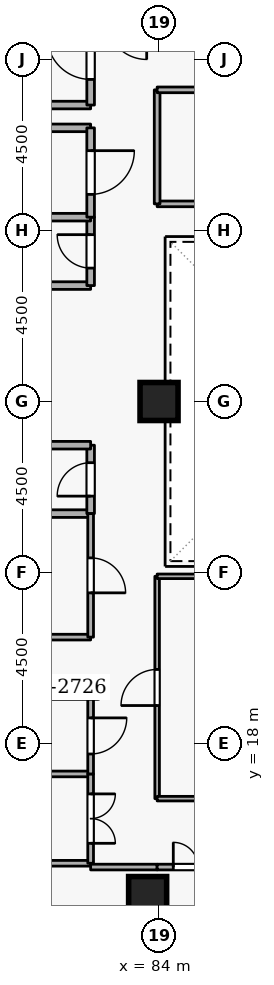
"""IFC4 building model, lengths in metres.
Left out: names, types, materials, properties, quantities, classifications, styles, units other than length and angle.
Written with IfcOpenShell. Run it as: python <this file> out.ifc"""

import sys

from ifc_helpers import new_model, si_unit, direction, frame, frame_2d, origin, origin_2d, place, context, subcontext, project, spatial, rectangle, extrude, element, fill, save


model = new_model("IFC4")
c1 = context("Model", 3, precision=1e-05, world=origin(), true_north=direction((0.0, 1.0)))
c2 = subcontext(c1, "Body", "Model", "MODEL_VIEW")
j1 = project(units=[si_unit("LENGTHUNIT", "METRE"), si_unit("PLANEANGLEUNIT", "RADIAN")], contexts=[c1])
p1 = place(None, origin())
s1 = spatial("IfcSite", under=j1, at=p1, CompositionType="ELEMENT")
p2 = place(p1, origin())
s2 = spatial("IfcBuilding", under=s1, at=p2, CompositionType="ELEMENT")
p3 = place(p2, frame((0.0, 0.0, 225.9)))
s3 = spatial("IfcBuildingStorey", under=s2, at=p3, CompositionType="ELEMENT", Elevation=225.9)
p4 = place(p3, frame((76.6, 19.45, 0.0), z_axis=(0.0, 0.0, 1.0), x_axis=(1.0, 0.0, 0.0)))
e1 = element("IfcWall", 1, at=p4, inside=s3, PredefinedType="SHEAR", context=c2, shape_type="SweptSolid", body=[
    extrude(rectangle(XDim=5.8, YDim=0.5, at=frame_2d((2.9, 0.0))), origin(), (0.0, 0.0, 1.0), 3.6),
])
for number, where, z_axis, x_axis in (
    (2, (83.7, 14.0, 0.0), (0.0, 0.0, 1.0), (1.0, 0.0, 0.0)),
    (3, (84.0, 27.0, 0.0), (0.0, 0.0, 1.0), (1.0, 0.0, 0.0)),
):
    element("IfcColumn", number, at=place(p3, frame(where, z_axis=z_axis, x_axis=x_axis)), inside=s3, PredefinedType="COLUMN", context=c2, shape_type="SweptSolid", body=[
        extrude(rectangle(XDim=1.0, YDim=1.0, at=origin_2d()), origin(), (0.0, 0.0, 1.0), 3.6),
    ])
p5 = place(p3, frame((79.9, 34.8, 0.0), z_axis=(0.0, 0.0, 1.0), x_axis=(1.0, 0.0, 0.0)))
e4 = element("IfcWall", 4, at=p5, inside=s3, PredefinedType="STANDARD", context=c2, shape_type="SweptSolid", body=[
    extrude(rectangle(XDim=2.3, YDim=0.2, at=frame_2d((1.15, 0.0))), origin(), (0.0, 0.0, 1.0), 2.505),
])
p6 = place(p3, frame((82.2, 34.8, 0.0), z_axis=(0.0, 0.0, 1.0), x_axis=(0.0, 1.0, 0.0)))
e5 = element("IfcWall", 5, at=p6, inside=s3, PredefinedType="STANDARD", context=c2, shape_type="SweptSolid", body=[
    extrude(rectangle(XDim=2.5, YDim=0.2, at=frame_2d((1.25, 0.0))), origin(), (0.0, 0.0, 1.0), 3.3),
])
p7 = place(p6, frame((0.675, 0.0, 0.0)))
e6 = element("IfcOpeningElement", 6, at=p7, cuts=e5, PredefinedType="OPENING", context=c2, shape_type="SweptSolid", body=[
    extrude(rectangle(XDim=1.15, YDim=2.1, at=frame_2d((0.575, 1.05))), frame((0.0, 0.11, 0.0), z_axis=(0.0, -1.0, 0.0), x_axis=(1.0, 0.0, 0.0)), (0.0, 0.0, 1.0), 0.22),
])
p8 = place(p3, frame((80.15, 24.05, 0.0), z_axis=(0.0, 0.0, 1.0), x_axis=(1.0, 0.0, 0.0)))
e7 = element("IfcWall", 7, at=p8, inside=s3, PredefinedType="STANDARD", context=c2, shape_type="SweptSolid", body=[
    extrude(rectangle(XDim=2.05, YDim=0.2, at=frame_2d((1.025, 0.0))), origin(), (0.0, 0.0, 1.0), 3.3),
])
p9 = place(p3, frame((82.2, 24.05, 0.0), z_axis=(0.0, 0.0, 1.0), x_axis=(0.0, 1.0, 0.0)))
e8 = element("IfcWall", 8, at=p9, inside=s3, PredefinedType="STANDARD", context=c2, shape_type="SweptSolid", body=[
    extrude(rectangle(XDim=1.8, YDim=0.2, at=frame_2d((0.9, 0.0))), origin(), (0.0, 0.0, 1.0), 3.3),
])
p10 = place(p9, frame((0.46, 0.0, 0.0)))
e9 = element("IfcOpeningElement", 9, at=p10, cuts=e8, PredefinedType="OPENING", context=c2, shape_type="SweptSolid", body=[
    extrude(rectangle(XDim=0.88, YDim=2.04, at=frame_2d((0.44, 1.02))), frame((0.0, 0.11, 0.0), z_axis=(0.0, -1.0, 0.0), x_axis=(1.0, 0.0, 0.0)), (0.0, 0.0, 1.0), 0.22),
])
for number, where, z_axis, x_axis in (
    (10, (82.2, 25.85, 0.0), (0.0, 0.0, 1.0), (-1.0, 0.0, 0.0)),
    (11, (80.15, 30.05, 0.0), (0.0, 0.0, 1.0), (1.0, 0.0, 0.0)),
):
    element("IfcWall", number, at=place(p3, frame(where, z_axis=z_axis, x_axis=x_axis)), inside=s3, PredefinedType="STANDARD", context=c2, shape_type="SweptSolid", body=[
        extrude(rectangle(XDim=2.05, YDim=0.2, at=frame_2d((1.025, 0.0))), origin(), (0.0, 0.0, 1.0), 3.3),
    ])
p11 = place(p3, frame((82.2, 30.05, 0.0), z_axis=(0.0, 0.0, 1.0), x_axis=(0.0, 1.0, 0.0)))
e12 = element("IfcWall", 12, at=p11, inside=s3, PredefinedType="STANDARD", context=c2, shape_type="SweptSolid", body=[
    extrude(rectangle(XDim=1.8, YDim=0.2, at=frame_2d((0.9, 0.0))), origin(), (0.0, 0.0, 1.0), 3.3),
])
p12 = place(p11, frame((0.46, 0.0, 0.0)))
e13 = element("IfcOpeningElement", 13, at=p12, cuts=e12, PredefinedType="OPENING", context=c2, shape_type="SweptSolid", body=[
    extrude(rectangle(XDim=0.88, YDim=2.04, at=frame_2d((0.44, 1.02))), frame((0.0, 0.11, 0.0), z_axis=(0.0, -1.0, 0.0), x_axis=(1.0, 0.0, 0.0)), (0.0, 0.0, 1.0), 0.22),
])
p13 = place(p3, frame((82.2, 31.85, 0.0), z_axis=(0.0, 0.0, 1.0), x_axis=(-1.0, 0.0, 0.0)))
e14 = element("IfcWall", 14, at=p13, inside=s3, PredefinedType="STANDARD", context=c2, shape_type="SweptSolid", body=[
    extrude(rectangle(XDim=2.05, YDim=0.2, at=frame_2d((1.025, 0.0))), origin(), (0.0, 0.0, 1.0), 3.3),
])
p14 = place(p3, frame((80.15, 34.2, 0.0), z_axis=(0.0, 0.0, 1.0), x_axis=(1.0, 0.0, 0.0)))
e15 = element("IfcWall", 15, at=p14, inside=s3, PredefinedType="STANDARD", context=c2, shape_type="SweptSolid", body=[
    extrude(rectangle(XDim=2.05, YDim=0.2, at=frame_2d((1.025, 0.0))), origin(), (0.0, 0.0, 1.0), 2.505),
])
p15 = place(p3, frame((82.2, 34.2, 0.0), z_axis=(0.0, 0.0, 1.0), x_axis=(0.0, -1.0, 0.0)))
e16 = element("IfcWall", 16, at=p15, inside=s3, PredefinedType="STANDARD", context=c2, shape_type="SweptSolid", body=[
    extrude(rectangle(XDim=2.35, YDim=0.2, at=frame_2d((1.175, 0.0))), origin(), (0.0, 0.0, 1.0), 3.3),
])
p16 = place(p15, frame((0.6, 0.0, 0.0)))
e17 = element("IfcOpeningElement", 17, at=p16, cuts=e16, PredefinedType="OPENING", context=c2, shape_type="SweptSolid", body=[
    extrude(rectangle(XDim=1.15, YDim=2.1, at=frame_2d((0.575, 1.05))), frame((0.0, 0.11, 0.0), z_axis=(0.0, -1.0, 0.0), x_axis=(1.0, 0.0, 0.0)), (0.0, 0.0, 1.0), 0.22),
])
p17 = place(p3, frame((82.2, 20.8, 0.0), z_axis=(0.0, 0.0, 1.0), x_axis=(-1.0, 0.0, 0.0)))
e18 = element("IfcWall", 18, at=p17, inside=s3, PredefinedType="PARTITIONING", context=c2, shape_type="SweptSolid", body=[
    extrude(rectangle(XDim=2.05, YDim=0.15, at=frame_2d((1.025, 0.0))), origin(), (0.0, 0.0, 1.0), 3.3),
])
p18 = place(p3, frame((82.2, 24.05, 0.0), z_axis=(0.0, 0.0, 1.0), x_axis=(0.0, -1.0, 0.0)))
e19 = element("IfcWall", 19, at=p18, inside=s3, PredefinedType="PARTITIONING", context=c2, shape_type="SweptSolid", body=[
    extrude(rectangle(XDim=3.25, YDim=0.15, at=frame_2d((1.625, 0.0))), origin(), (0.0, 0.0, 1.0), 3.3),
])
p19 = place(p18, frame((1.165, 0.0, 0.0)))
e20 = element("IfcOpeningElement", 20, at=p19, cuts=e19, PredefinedType="OPENING", context=c2, shape_type="SweptSolid", body=[
    extrude(rectangle(XDim=0.92, YDim=2.08, at=frame_2d((0.46, 1.04))), frame((0.0, 0.085, 0.0), z_axis=(0.0, -1.0, 0.0), x_axis=(1.0, 0.0, 0.0)), (0.0, 0.0, 1.0), 0.17),
])
for number, where, z_axis, x_axis in (
    (21, (82.2, 14.85, 0.0), (0.0, 0.0, 1.0), (-1.0, 0.0, 0.0)),
    (22, (64.78, 17.2, 0.0), (0.0, 0.0, 1.0), (1.0, 0.0, 0.0)),
):
    element("IfcWall", number, at=place(p3, frame(where, z_axis=z_axis, x_axis=x_axis)), inside=s3, PredefinedType="PARTITIONING", context=c2, shape_type="SweptSolid", body=[
        extrude(rectangle(XDim=17.42, YDim=0.15, at=frame_2d((8.71, 0.0))), origin(), (0.0, 0.0, 1.0), 3.3),
    ])
p20 = place(p3, frame((82.2, 17.2, 0.0), z_axis=(0.0, 0.0, 1.0), x_axis=(0.0, -1.0, 0.0)))
e23 = element("IfcWall", 23, at=p20, inside=s3, PredefinedType="PARTITIONING", context=c2, shape_type="SweptSolid", body=[
    extrude(rectangle(XDim=2.35, YDim=0.15, at=frame_2d((1.175, 0.0))), origin(), (0.0, 0.0, 1.0), 3.3),
])
p21 = place(p20, frame((0.525, 0.0, 0.0)))
e24 = element("IfcOpeningElement", 24, at=p21, cuts=e23, PredefinedType="OPENING", context=c2, shape_type="SweptSolid", body=[
    extrude(rectangle(XDim=1.3, YDim=2.12, at=frame_2d((0.65, 1.06))), frame((0.0, 0.085, 0.0), z_axis=(0.0, -1.0, 0.0), x_axis=(1.0, 0.0, 0.0)), (0.0, 0.0, 1.0), 0.17),
])
p22 = place(p3, frame((82.2, 19.2, 0.0), z_axis=(0.0, 0.0, 1.0), x_axis=(0.0, -1.0, 0.0)))
e25 = element("IfcWall", 25, at=p22, inside=s3, PredefinedType="PARTITIONING", context=c2, shape_type="SweptSolid", body=[
    extrude(rectangle(XDim=2.0, YDim=0.15, at=frame_2d((1.0, 0.0))), origin(), (0.0, 0.0, 1.0), 3.3),
])
p23 = place(p22, frame((0.525, 0.0, 0.0)))
e26 = element("IfcOpeningElement", 26, at=p23, cuts=e25, PredefinedType="OPENING", context=c2, shape_type="SweptSolid", body=[
    extrude(rectangle(XDim=0.95, YDim=2.1, at=frame_2d((0.475, 1.05))), frame((0.0, 0.085, 0.0), z_axis=(0.0, -1.0, 0.0), x_axis=(1.0, 0.0, 0.0)), (0.0, 0.0, 1.0), 0.17),
])
p24 = place(p3, frame((82.2, 14.75, 0.0), z_axis=(0.0, 0.0, 1.0), x_axis=(1.0, 0.0, 0.0)))
e27 = element("IfcWall", 27, at=p24, inside=s3, PredefinedType="PARTITIONING", context=c2, shape_type="SweptSolid", body=[
    extrude(rectangle(XDim=1.75, YDim=0.15, at=frame_2d((0.875, 0.0))), origin(), (0.0, 0.0, 1.0), 3.3),
])
p25 = place(p3, frame((83.95, 14.75, 0.0), z_axis=(0.0, 0.0, 1.0), x_axis=(1.0, 0.0, 0.0)))
e28 = element("IfcWall", 28, at=p25, inside=s3, PredefinedType="PARTITIONING", context=c2, shape_type="SweptSolid", body=[
    extrude(rectangle(XDim=2.15, YDim=0.15, at=frame_2d((1.075, 0.0))), origin(), (0.0, 0.0, 1.0), 3.3),
])
p26 = place(p25, frame((0.425, 0.0, 0.0)))
e29 = element("IfcOpeningElement", 29, at=p26, cuts=e28, PredefinedType="OPENING", context=c2, shape_type="SweptSolid", body=[
    extrude(rectangle(XDim=1.3, YDim=2.12, at=frame_2d((0.65, 1.06))), frame((0.0, 0.085, 0.0), z_axis=(0.0, -1.0, 0.0), x_axis=(1.0, 0.0, 0.0)), (0.0, 0.0, 1.0), 0.17),
])
p27 = place(p3, frame((83.95, 16.55, 0.0), z_axis=(0.0, 0.0, 1.0), x_axis=(0.0, 1.0, 0.0)))
e30 = element("IfcWall", 30, at=p27, inside=s3, PredefinedType="PARTITIONING", context=c2, shape_type="SweptSolid", body=[
    extrude(rectangle(XDim=5.85, YDim=0.12, at=frame_2d((2.925, 0.0))), origin(), (0.0, 0.0, 1.0), 3.3),
])
p28 = place(p27, frame((2.45, 0.0, 0.0)))
e31 = element("IfcOpeningElement", 31, at=p28, cuts=e30, PredefinedType="OPENING", context=c2, shape_type="SweptSolid", body=[
    extrude(rectangle(XDim=0.95, YDim=2.1, at=frame_2d((0.475, 1.05))), frame((0.0, 0.07, 0.0), z_axis=(0.0, -1.0, 0.0), x_axis=(1.0, 0.0, 0.0)), (0.0, 0.0, 1.0), 0.14),
])
for number, where, z_axis, x_axis in (
    (32, (83.95, 22.4, 0.0), (0.0, 0.0, 1.0), (1.0, 0.0, 0.0)),
    (33, (89.3, 16.55, 0.0), (0.0, 0.0, 1.0), (-1.0, 0.0, 0.0)),
):
    element("IfcWall", number, at=place(p3, frame(where, z_axis=z_axis, x_axis=x_axis)), inside=s3, PredefinedType="PARTITIONING", context=c2, shape_type="SweptSolid", body=[
        extrude(rectangle(XDim=5.35, YDim=0.12, at=frame_2d((2.675, 0.0))), origin(), (0.0, 0.0, 1.0), 3.3),
    ])
p29 = place(p3, frame((87.95, 32.2, 0.0), z_axis=(0.0, 0.0, 1.0), x_axis=(-1.0, 0.0, 0.0)))
e34 = element("IfcWall", 34, at=p29, inside=s3, PredefinedType="PARTITIONING", context=c2, shape_type="SweptSolid", body=[
    extrude(rectangle(XDim=4.0, YDim=0.15, at=frame_2d((2.0, 0.0))), origin(), (0.0, 0.0, 1.0), 3.3),
])
p30 = place(p3, frame((83.95, 32.2, 0.0), z_axis=(0.0, 0.0, 1.0), x_axis=(0.0, 1.0, 0.0)))
e35 = element("IfcWall", 35, at=p30, inside=s3, PredefinedType="PARTITIONING", context=c2, shape_type="SweptSolid", body=[
    extrude(rectangle(XDim=3.0, YDim=0.15, at=frame_2d((1.5, 0.0))), origin(), (0.0, 0.0, 1.0), 3.3),
])
p31 = place(p3, frame((83.95, 35.2, 0.0), z_axis=(0.0, 0.0, 1.0), x_axis=(1.0, 0.0, 0.0)))
e36 = element("IfcWall", 36, at=p31, inside=s3, PredefinedType="PARTITIONING", context=c2, shape_type="SweptSolid", body=[
    extrude(rectangle(XDim=4.0, YDim=0.15, at=frame_2d((2.0, 0.0))), origin(), (0.0, 0.0, 1.0), 3.3),
])
p32 = place(p31, frame((1.35, 0.0, 0.0)))
e37 = element("IfcOpeningElement", 37, at=p32, cuts=e36, PredefinedType="OPENING", context=c2, shape_type="SweptSolid", body=[
    extrude(rectangle(XDim=1.3, YDim=2.12, at=frame_2d((0.65, 1.06))), frame((0.0, 0.085, 0.0), z_axis=(0.0, -1.0, 0.0), x_axis=(1.0, 0.0, 0.0)), (0.0, 0.0, 1.0), 0.17),
])
p33 = place(p7, origin())
e38 = element("IfcDoor", 38, at=p33, inside=s3, OperationType="SINGLE_SWING_RIGHT", PredefinedType="DOOR", context=c2, shape_type="SweptSolid", body=[
    extrude(rectangle(XDim=1.15, YDim=2.1, at=frame_2d((0.575, 1.05))), frame((0.0, 0.025, 0.0), z_axis=(0.0, -1.0, 0.0), x_axis=(1.0, 0.0, 0.0)), (0.0, 0.0, 1.0), 0.05),
])
fill(e6, e38)
p34 = place(p10, origin())
e39 = element("IfcDoor", 39, at=p34, inside=s3, OperationType="SINGLE_SWING_LEFT", PredefinedType="DOOR", context=c2, shape_type="SweptSolid", body=[
    extrude(rectangle(XDim=0.88, YDim=2.04, at=frame_2d((0.44, 1.02))), frame((0.0, 0.025, 0.0), z_axis=(0.0, -1.0, 0.0), x_axis=(1.0, 0.0, 0.0)), (0.0, 0.0, 1.0), 0.05),
])
fill(e9, e39)
p35 = place(p12, origin())
e40 = element("IfcDoor", 40, at=p35, inside=s3, OperationType="SINGLE_SWING_RIGHT", PredefinedType="DOOR", context=c2, shape_type="SweptSolid", body=[
    extrude(rectangle(XDim=0.88, YDim=2.04, at=frame_2d((0.44, 1.02))), frame((0.0, 0.025, 0.0), z_axis=(0.0, -1.0, 0.0), x_axis=(1.0, 0.0, 0.0)), (0.0, 0.0, 1.0), 0.05),
])
fill(e13, e40)
p36 = place(p19, origin())
e41 = element("IfcDoor", 41, at=p36, inside=s3, OperationType="SINGLE_SWING_RIGHT", PredefinedType="DOOR", context=c2, shape_type="SweptSolid", body=[
    extrude(rectangle(XDim=0.92, YDim=2.08, at=frame_2d((0.46, 1.04))), frame((0.0, 0.025, 0.0), z_axis=(0.0, -1.0, 0.0), x_axis=(1.0, 0.0, 0.0)), (0.0, 0.0, 1.0), 0.05),
])
fill(e20, e41)
p37 = place(p16, origin())
e42 = element("IfcDoor", 42, at=p37, inside=s3, OperationType="SINGLE_SWING_LEFT", PredefinedType="DOOR", context=c2, shape_type="SweptSolid", body=[
    extrude(rectangle(XDim=1.15, YDim=2.1, at=frame_2d((0.575, 1.05))), frame((0.0, 0.025, 0.0), z_axis=(0.0, -1.0, 0.0), x_axis=(1.0, 0.0, 0.0)), (0.0, 0.0, 1.0), 0.05),
])
fill(e17, e42)
p38 = place(p21, origin())
e43 = element("IfcDoor", 43, at=p38, inside=s3, OperationType="DOUBLE_DOOR_SINGLE_SWING", PredefinedType="DOOR", context=c2, shape_type="SweptSolid", body=[
    extrude(rectangle(XDim=1.3, YDim=2.12, at=frame_2d((0.65, 1.06))), frame((0.0, 0.025, 0.0), z_axis=(0.0, -1.0, 0.0), x_axis=(1.0, 0.0, 0.0)), (0.0, 0.0, 1.0), 0.05),
])
fill(e24, e43)
p39 = place(p23, origin())
e44 = element("IfcDoor", 44, at=p39, inside=s3, OperationType="SINGLE_SWING_LEFT", PredefinedType="DOOR", context=c2, shape_type="SweptSolid", body=[
    extrude(rectangle(XDim=0.95, YDim=2.1, at=frame_2d((0.475, 1.05))), frame((0.0, 0.025, 0.0), z_axis=(0.0, -1.0, 0.0), x_axis=(1.0, 0.0, 0.0)), (0.0, 0.0, 1.0), 0.05),
])
fill(e26, e44)
p40 = place(p26, origin())
e45 = element("IfcDoor", 45, at=p40, inside=s3, OperationType="DOUBLE_DOOR_SINGLE_SWING", PredefinedType="DOOR", context=c2, shape_type="SweptSolid", body=[
    extrude(rectangle(XDim=1.3, YDim=2.12, at=frame_2d((0.65, 1.06))), frame((0.0, 0.025, 0.0), z_axis=(0.0, -1.0, 0.0), x_axis=(1.0, 0.0, 0.0)), (0.0, 0.0, 1.0), 0.05),
])
fill(e29, e45)
p41 = place(p28, origin())
e46 = element("IfcDoor", 46, at=p41, inside=s3, OperationType="SINGLE_SWING_LEFT", PredefinedType="DOOR", context=c2, shape_type="SweptSolid", body=[
    extrude(rectangle(XDim=0.95, YDim=2.1, at=frame_2d((0.475, 1.05))), frame((0.0, 0.025, 0.0), z_axis=(0.0, -1.0, 0.0), x_axis=(1.0, 0.0, 0.0)), (0.0, 0.0, 1.0), 0.05),
])
fill(e31, e46)
save(model, sys.argv[1])
